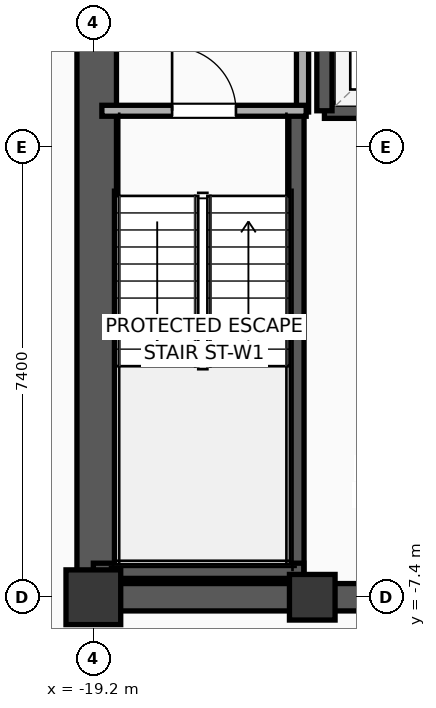
"""IFC4 building model, lengths in metres.
Left out: names, types, materials, properties, quantities, classifications, styles, units other than length and angle.
Written with IfcOpenShell. Run it as: python <this file> out.ifc"""

import sys

from ifc_helpers import new_model, si_unit, direction, frame, frame_2d, origin, origin_2d, place, context, subcontext, project, spatial, rectangle, extrude, element, fill, save


model = new_model("IFC4")
c1 = context("Model", 3, precision=1e-05, world=origin(), true_north=direction((0.0, 1.0)))
c2 = subcontext(c1, "Body", "Model", "MODEL_VIEW")
j1 = project(units=[si_unit("LENGTHUNIT", "METRE"), si_unit("PLANEANGLEUNIT", "RADIAN")], contexts=[c1])
p1 = place(None, origin())
s1 = spatial("IfcSite", under=j1, at=p1, CompositionType="ELEMENT")
p2 = place(p1, origin())
s2 = spatial("IfcBuilding", under=s1, at=p2, CompositionType="ELEMENT")
p3 = place(p2, frame((0.0, 0.0, 211.9)))
s3 = spatial("IfcBuildingStorey", under=s2, at=p3, CompositionType="ELEMENT", Elevation=211.9)
p4 = place(p3, frame((-19.2, -7.4, 0.0), z_axis=(0.0, 0.0, 1.0), x_axis=(1.0, 0.0, 0.0)))
e1 = element("IfcColumn", 1, at=p4, inside=s3, PredefinedType="COLUMN", context=c2, shape_type="SweptSolid", body=[
    extrude(rectangle(XDim=0.9, YDim=0.9, at=origin_2d()), origin(), (0.0, 0.0, 1.0), 3.9),
])
p5 = place(p3, frame((-15.6, -7.4, 0.0), z_axis=(0.0, 0.0, 1.0), x_axis=(1.0, 0.0, 0.0)))
e2 = element("IfcColumn", 2, at=p5, inside=s3, PredefinedType="COLUMN", context=c2, shape_type="SweptSolid", body=[
    extrude(rectangle(XDim=0.75, YDim=0.75, at=origin_2d()), origin(), (0.0, 0.0, 1.0), 3.9),
])
p6 = place(p3, frame((-19.425, -7.4, 0.0), z_axis=(0.0, 0.0, 1.0), x_axis=(1.0, 0.0, 0.0)))
e3 = element("IfcWall", 3, at=p6, inside=s3, PredefinedType="SHEAR", context=c2, shape_type="SweptSolid", body=[
    extrude(rectangle(XDim=7.25, YDim=0.45, at=frame_2d((3.625, 0.0))), origin(), (0.0, 0.0, 1.0), 3.65),
])
p7 = place(p3, frame((-19.145, -7.4, 0.0), z_axis=(0.0, 0.0, 1.0), x_axis=(0.0, 1.0, 0.0)))
e4 = element("IfcWall", 4, at=p7, inside=s3, PredefinedType="SHEAR", context=c2, shape_type="SweptSolid", body=[
    extrude(rectangle(XDim=14.8, YDim=0.65, at=frame_2d((7.4, 0.0))), origin(), (0.0, 0.0, 1.0), 3.65),
])
p8 = place(p3, frame((-15.86, -7.085, 0.0), z_axis=(0.0, 0.0, 1.0), x_axis=(0.0, 1.0, 0.0)))
e5 = element("IfcWall", 5, at=p8, inside=s3, PredefinedType="SOLIDWALL", context=c2, shape_type="SweptSolid", body=[
    extrude(rectangle(XDim=7.685, YDim=0.25, at=frame_2d((3.843, 0.0))), origin(), (0.0, 0.0, 1.0), 3.65),
])
p9 = place(p3, frame((-19.2, -6.965, 0.0), z_axis=(0.0, 0.0, 1.0), x_axis=(1.0, 0.0, 0.0)))
e6 = element("IfcWall", 6, at=p9, inside=s3, PredefinedType="SOLIDWALL", context=c2, shape_type="SweptSolid", body=[
    extrude(rectangle(XDim=3.46, YDim=0.25, at=frame_2d((1.73, 0.0))), origin(), (0.0, 0.0, 1.0), 3.65),
])
p10 = place(p3, frame((-15.4, 0.6, 0.0), z_axis=(0.0, 0.0, 1.0), x_axis=(1.0, 0.0, 0.0)))
e7 = element("IfcWall", 7, at=p10, inside=s3, PredefinedType="SOLIDWALL", context=c2, shape_type="SweptSolid", body=[
    extrude(rectangle(XDim=3.0, YDim=0.25, at=frame_2d((1.5, 0.0))), origin(), (0.0, 0.0, 1.0), 3.65),
])
p11 = place(p3, frame((-15.4, 2.9, 0.0), z_axis=(0.0, 0.0, 1.0), x_axis=(0.0, -1.0, 0.0)))
e8 = element("IfcWall", 8, at=p11, inside=s3, PredefinedType="SOLIDWALL", context=c2, shape_type="SweptSolid", body=[
    extrude(rectangle(XDim=2.3, YDim=0.25, at=frame_2d((1.15, 0.0))), origin(), (0.0, 0.0, 1.0), 3.65),
])
p12 = place(p3, frame((-15.76, 0.58, 0.0), z_axis=(0.0, 0.0, 1.0), x_axis=(0.0, 1.0, 0.0)))
e9 = element("IfcWall", 9, at=p12, inside=s3, PredefinedType="PARTITIONING", context=c2, shape_type="SweptSolid", body=[
    extrude(rectangle(XDim=2.52, YDim=0.2, at=frame_2d((1.26, 0.0))), origin(), (0.0, 0.0, 1.0), 3.65),
])
p13 = place(p3, frame((-19.06, 0.6, 0.0), z_axis=(0.0, 0.0, 1.0), x_axis=(1.0, 0.0, 0.0)))
e10 = element("IfcWall", 10, at=p13, inside=s3, PredefinedType="PARTITIONING", context=c2, shape_type="SweptSolid", body=[
    extrude(rectangle(XDim=3.36, YDim=0.18, at=frame_2d((1.68, 0.0))), origin(), (0.0, 0.0, 1.0), 3.65),
])
p14 = place(p13, frame((1.155, 0.0, 0.0)))
e11 = element("IfcOpeningElement", 11, at=p14, cuts=e10, PredefinedType="OPENING", context=c2, shape_type="SweptSolid", body=[
    extrude(rectangle(XDim=1.05, YDim=2.05, at=frame_2d((0.525, 1.025))), frame((0.0, 0.1, 0.0), z_axis=(0.0, -1.0, 0.0), x_axis=(1.0, 0.0, 0.0)), (0.0, 0.0, 1.0), 0.2),
])
p15 = place(p14, origin())
e12 = element("IfcDoor", 12, at=p15, inside=s3, OperationType="SINGLE_SWING_LEFT", PredefinedType="DOOR", context=c2, shape_type="SweptSolid", body=[
    extrude(rectangle(XDim=1.05, YDim=2.05, at=frame_2d((0.525, 1.025))), frame((0.0, 0.025, 0.0), z_axis=(0.0, -1.0, 0.0), x_axis=(1.0, 0.0, 0.0)), (0.0, 0.0, 1.0), 0.05),
])
fill(e11, e12)
save(model, sys.argv[1])
